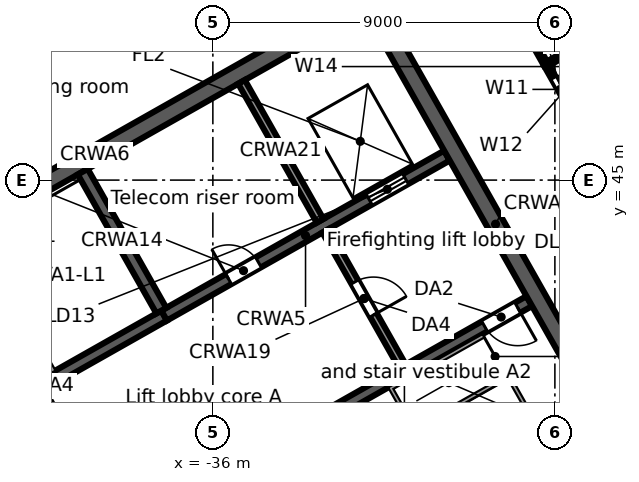
"""IFC4 building model, lengths in metres.
Left out: names, types, materials, properties, quantities, classifications, styles, units other than length and angle.
Written with IfcOpenShell. Run it as: python <this file> out.ifc"""

import sys

from ifc_helpers import new_model, si_unit, direction, frame, frame_2d, origin, place, context, subcontext, project, spatial, rectangle, extrude, element, fill, save


model = new_model("IFC4")
c1 = context("Model", 3, precision=1e-05, world=origin(), true_north=direction((0.0, 1.0)))
c2 = subcontext(c1, "Body", "Model", "MODEL_VIEW")
j1 = project(units=[si_unit("LENGTHUNIT", "METRE"), si_unit("PLANEANGLEUNIT", "RADIAN")], contexts=[c1])
p1 = place(None, origin())
s1 = spatial("IfcSite", under=j1, at=p1, CompositionType="ELEMENT")
p2 = place(p1, origin())
s2 = spatial("IfcBuilding", under=s1, at=p2, CompositionType="ELEMENT")
p3 = place(p2, frame((0.0, 0.0, 227.0)))
s3 = spatial("IfcBuildingStorey", under=s2, at=p3, CompositionType="ELEMENT", Elevation=227.0)
p4 = place(p3, frame((-0.046, 47.974, 0.0), z_axis=(0.0, 0.0, 1.0), x_axis=(-0.870356579543, -0.492421998337, 0.0)))
e1 = element("IfcWall", 1, at=p4, inside=s3, PredefinedType="STANDARD", context=c2, shape_type="SweptSolid", body=[
    extrude(rectangle(XDim=43.754, YDim=0.25, at=frame_2d((21.877, 0.0))), origin(), (0.0, 0.0, 1.0), 3.55),
])
p5 = place(p4, frame((41.061, 0.0, 0.8)))
e2 = element("IfcOpeningElement", 2, at=p5, cuts=e1, PredefinedType="OPENING", context=c2, shape_type="SweptSolid", body=[
    extrude(rectangle(XDim=2.4, YDim=2.2, at=frame_2d((1.2, 1.1))), frame((0.0, 0.135, 0.0), z_axis=(0.0, -1.0, 0.0), x_axis=(1.0, 0.0, 0.0)), (0.0, 0.0, 1.0), 0.27),
])
p6 = place(p4, frame((38.443, 0.0, 0.0)))
e3 = element("IfcOpeningElement", 3, at=p6, cuts=e1, PredefinedType="OPENING", context=c2, shape_type="SweptSolid", body=[
    extrude(rectangle(XDim=1.8, YDim=2.4, at=frame_2d((0.9, 1.2))), frame((0.0, 0.135, 0.0), z_axis=(0.0, -1.0, 0.0), x_axis=(1.0, 0.0, 0.0)), (0.0, 0.0, 1.0), 0.27),
])
p7 = place(p4, frame((35.225, 0.0, 0.8)))
e4 = element("IfcOpeningElement", 4, at=p7, cuts=e1, PredefinedType="OPENING", context=c2, shape_type="SweptSolid", body=[
    extrude(rectangle(XDim=2.4, YDim=2.2, at=frame_2d((1.2, 1.1))), frame((0.0, 0.135, 0.0), z_axis=(0.0, -1.0, 0.0), x_axis=(1.0, 0.0, 0.0)), (0.0, 0.0, 1.0), 0.27),
])
p8 = place(p4, frame((32.307, 0.0, 0.8)))
e5 = element("IfcOpeningElement", 5, at=p8, cuts=e1, PredefinedType="OPENING", context=c2, shape_type="SweptSolid", body=[
    extrude(rectangle(XDim=2.4, YDim=2.2, at=frame_2d((1.2, 1.1))), frame((0.0, 0.135, 0.0), z_axis=(0.0, -1.0, 0.0), x_axis=(1.0, 0.0, 0.0)), (0.0, 0.0, 1.0), 0.27),
])
p9 = place(p4, frame((29.688, 0.0, 0.0)))
e6 = element("IfcOpeningElement", 6, at=p9, cuts=e1, PredefinedType="OPENING", context=c2, shape_type="SweptSolid", body=[
    extrude(rectangle(XDim=1.8, YDim=2.4, at=frame_2d((0.9, 1.2))), frame((0.0, 0.135, 0.0), z_axis=(0.0, -1.0, 0.0), x_axis=(1.0, 0.0, 0.0)), (0.0, 0.0, 1.0), 0.27),
])
p10 = place(p4, frame((26.47, 0.0, 0.8)))
e7 = element("IfcOpeningElement", 7, at=p10, cuts=e1, PredefinedType="OPENING", context=c2, shape_type="SweptSolid", body=[
    extrude(rectangle(XDim=2.4, YDim=2.2, at=frame_2d((1.2, 1.1))), frame((0.0, 0.135, 0.0), z_axis=(0.0, -1.0, 0.0), x_axis=(1.0, 0.0, 0.0)), (0.0, 0.0, 1.0), 0.27),
])
p11 = place(p4, frame((23.552, 0.0, 0.8)))
e8 = element("IfcOpeningElement", 8, at=p11, cuts=e1, PredefinedType="OPENING", context=c2, shape_type="SweptSolid", body=[
    extrude(rectangle(XDim=2.4, YDim=2.2, at=frame_2d((1.2, 1.1))), frame((0.0, 0.135, 0.0), z_axis=(0.0, -1.0, 0.0), x_axis=(1.0, 0.0, 0.0)), (0.0, 0.0, 1.0), 0.27),
])
p12 = place(p4, frame((20.934, 0.0, 0.0)))
e9 = element("IfcOpeningElement", 9, at=p12, cuts=e1, PredefinedType="OPENING", context=c2, shape_type="SweptSolid", body=[
    extrude(rectangle(XDim=1.8, YDim=2.4, at=frame_2d((0.9, 1.2))), frame((0.0, 0.135, 0.0), z_axis=(0.0, -1.0, 0.0), x_axis=(1.0, 0.0, 0.0)), (0.0, 0.0, 1.0), 0.27),
])
p13 = place(p4, frame((17.716, 0.0, 0.8)))
e10 = element("IfcOpeningElement", 10, at=p13, cuts=e1, PredefinedType="OPENING", context=c2, shape_type="SweptSolid", body=[
    extrude(rectangle(XDim=2.4, YDim=2.2, at=frame_2d((1.2, 1.1))), frame((0.0, 0.135, 0.0), z_axis=(0.0, -1.0, 0.0), x_axis=(1.0, 0.0, 0.0)), (0.0, 0.0, 1.0), 0.27),
])
p14 = place(p4, frame((14.798, 0.0, 0.8)))
e11 = element("IfcOpeningElement", 11, at=p14, cuts=e1, PredefinedType="OPENING", context=c2, shape_type="SweptSolid", body=[
    extrude(rectangle(XDim=2.4, YDim=2.2, at=frame_2d((1.2, 1.1))), frame((0.0, 0.135, 0.0), z_axis=(0.0, -1.0, 0.0), x_axis=(1.0, 0.0, 0.0)), (0.0, 0.0, 1.0), 0.27),
])
p15 = place(p4, frame((12.179, 0.0, 0.0)))
e12 = element("IfcOpeningElement", 12, at=p15, cuts=e1, PredefinedType="OPENING", context=c2, shape_type="SweptSolid", body=[
    extrude(rectangle(XDim=1.8, YDim=2.4, at=frame_2d((0.9, 1.2))), frame((0.0, 0.135, 0.0), z_axis=(0.0, -1.0, 0.0), x_axis=(1.0, 0.0, 0.0)), (0.0, 0.0, 1.0), 0.27),
])
p16 = place(p4, frame((8.961, 0.0, 0.8)))
e13 = element("IfcOpeningElement", 13, at=p16, cuts=e1, PredefinedType="OPENING", context=c2, shape_type="SweptSolid", body=[
    extrude(rectangle(XDim=2.4, YDim=2.2, at=frame_2d((1.2, 1.1))), frame((0.0, 0.135, 0.0), z_axis=(0.0, -1.0, 0.0), x_axis=(1.0, 0.0, 0.0)), (0.0, 0.0, 1.0), 0.27),
])
p17 = place(p4, frame((6.043, 0.0, 0.8)))
e14 = element("IfcOpeningElement", 14, at=p17, cuts=e1, PredefinedType="OPENING", context=c2, shape_type="SweptSolid", body=[
    extrude(rectangle(XDim=2.4, YDim=2.2, at=frame_2d((1.2, 1.1))), frame((0.0, 0.135, 0.0), z_axis=(0.0, -1.0, 0.0), x_axis=(1.0, 0.0, 0.0)), (0.0, 0.0, 1.0), 0.27),
])
p18 = place(p4, frame((3.425, 0.0, 0.0)))
e15 = element("IfcOpeningElement", 15, at=p18, cuts=e1, PredefinedType="OPENING", context=c2, shape_type="SweptSolid", body=[
    extrude(rectangle(XDim=1.8, YDim=2.4, at=frame_2d((0.9, 1.2))), frame((0.0, 0.135, 0.0), z_axis=(0.0, -1.0, 0.0), x_axis=(1.0, 0.0, 0.0)), (0.0, 0.0, 1.0), 0.27),
])
p19 = place(p4, frame((0.207, 0.0, 0.8)))
e16 = element("IfcOpeningElement", 16, at=p19, cuts=e1, PredefinedType="OPENING", context=c2, shape_type="SweptSolid", body=[
    extrude(rectangle(XDim=2.4, YDim=2.2, at=frame_2d((1.2, 1.1))), frame((0.0, 0.135, 0.0), z_axis=(0.0, -1.0, 0.0), x_axis=(1.0, 0.0, 0.0)), (0.0, 0.0, 1.0), 0.27),
])
p20 = place(p3, frame((-58.732, 38.771, 0.0), z_axis=(0.0, 0.0, 1.0), x_axis=(0.870354824205, 0.492425100887, 0.0)))
e17 = element("IfcWall", 17, at=p20, inside=s3, PredefinedType="STANDARD", context=c2, shape_type="SweptSolid", body=[
    extrude(rectangle(XDim=64.006, YDim=0.25, at=frame_2d((32.003, 0.0))), origin(), (0.0, 0.0, 1.0), 3.55),
])
p21 = place(p20, frame((61.259, 0.0, 0.8)))
e18 = element("IfcOpeningElement", 18, at=p21, cuts=e17, PredefinedType="OPENING", context=c2, shape_type="SweptSolid", body=[
    extrude(rectangle(XDim=2.4, YDim=2.2, at=frame_2d((1.2, 1.1))), frame((0.0, 0.135, 0.0), z_axis=(0.0, -1.0, 0.0), x_axis=(1.0, 0.0, 0.0)), (0.0, 0.0, 1.0), 0.27),
])
p22 = place(p20, frame((58.216, 0.0, 0.8)))
e19 = element("IfcOpeningElement", 19, at=p22, cuts=e17, PredefinedType="OPENING", context=c2, shape_type="SweptSolid", body=[
    extrude(rectangle(XDim=2.4, YDim=2.2, at=frame_2d((1.2, 1.1))), frame((0.0, 0.135, 0.0), z_axis=(0.0, -1.0, 0.0), x_axis=(1.0, 0.0, 0.0)), (0.0, 0.0, 1.0), 0.27),
])
p23 = place(p20, frame((55.173, 0.0, 0.8)))
e20 = element("IfcOpeningElement", 20, at=p23, cuts=e17, PredefinedType="OPENING", context=c2, shape_type="SweptSolid", body=[
    extrude(rectangle(XDim=2.4, YDim=2.2, at=frame_2d((1.2, 1.1))), frame((0.0, 0.135, 0.0), z_axis=(0.0, -1.0, 0.0), x_axis=(1.0, 0.0, 0.0)), (0.0, 0.0, 1.0), 0.27),
])
p24 = place(p20, frame((52.129, 0.0, 0.8)))
e21 = element("IfcOpeningElement", 21, at=p24, cuts=e17, PredefinedType="OPENING", context=c2, shape_type="SweptSolid", body=[
    extrude(rectangle(XDim=2.4, YDim=2.2, at=frame_2d((1.2, 1.1))), frame((0.0, 0.135, 0.0), z_axis=(0.0, -1.0, 0.0), x_axis=(1.0, 0.0, 0.0)), (0.0, 0.0, 1.0), 0.27),
])
p25 = place(p20, frame((49.086, 0.0, 0.8)))
e22 = element("IfcOpeningElement", 22, at=p25, cuts=e17, PredefinedType="OPENING", context=c2, shape_type="SweptSolid", body=[
    extrude(rectangle(XDim=2.4, YDim=2.2, at=frame_2d((1.2, 1.1))), frame((0.0, 0.135, 0.0), z_axis=(0.0, -1.0, 0.0), x_axis=(1.0, 0.0, 0.0)), (0.0, 0.0, 1.0), 0.27),
])
p26 = place(p20, frame((46.043, 0.0, 0.8)))
e23 = element("IfcOpeningElement", 23, at=p26, cuts=e17, PredefinedType="OPENING", context=c2, shape_type="SweptSolid", body=[
    extrude(rectangle(XDim=2.4, YDim=2.2, at=frame_2d((1.2, 1.1))), frame((0.0, 0.135, 0.0), z_axis=(0.0, -1.0, 0.0), x_axis=(1.0, 0.0, 0.0)), (0.0, 0.0, 1.0), 0.27),
])
p27 = place(p20, frame((43.0, 0.0, 0.8)))
e24 = element("IfcOpeningElement", 24, at=p27, cuts=e17, PredefinedType="OPENING", context=c2, shape_type="SweptSolid", body=[
    extrude(rectangle(XDim=2.4, YDim=2.2, at=frame_2d((1.2, 1.1))), frame((0.0, 0.135, 0.0), z_axis=(0.0, -1.0, 0.0), x_axis=(1.0, 0.0, 0.0)), (0.0, 0.0, 1.0), 0.27),
])
p28 = place(p20, frame((39.956, 0.0, 0.8)))
e25 = element("IfcOpeningElement", 25, at=p28, cuts=e17, PredefinedType="OPENING", context=c2, shape_type="SweptSolid", body=[
    extrude(rectangle(XDim=2.4, YDim=2.2, at=frame_2d((1.2, 1.1))), frame((0.0, 0.135, 0.0), z_axis=(0.0, -1.0, 0.0), x_axis=(1.0, 0.0, 0.0)), (0.0, 0.0, 1.0), 0.27),
])
p29 = place(p20, frame((36.913, 0.0, 0.8)))
e26 = element("IfcOpeningElement", 26, at=p29, cuts=e17, PredefinedType="OPENING", context=c2, shape_type="SweptSolid", body=[
    extrude(rectangle(XDim=2.4, YDim=2.2, at=frame_2d((1.2, 1.1))), frame((0.0, 0.135, 0.0), z_axis=(0.0, -1.0, 0.0), x_axis=(1.0, 0.0, 0.0)), (0.0, 0.0, 1.0), 0.27),
])
p30 = place(p20, frame((33.87, 0.0, 0.8)))
e27 = element("IfcOpeningElement", 27, at=p30, cuts=e17, PredefinedType="OPENING", context=c2, shape_type="SweptSolid", body=[
    extrude(rectangle(XDim=2.4, YDim=2.2, at=frame_2d((1.2, 1.1))), frame((0.0, 0.135, 0.0), z_axis=(0.0, -1.0, 0.0), x_axis=(1.0, 0.0, 0.0)), (0.0, 0.0, 1.0), 0.27),
])
p31 = place(p20, frame((30.826, 0.0, 0.8)))
e28 = element("IfcOpeningElement", 28, at=p31, cuts=e17, PredefinedType="OPENING", context=c2, shape_type="SweptSolid", body=[
    extrude(rectangle(XDim=2.4, YDim=2.2, at=frame_2d((1.2, 1.1))), frame((0.0, 0.135, 0.0), z_axis=(0.0, -1.0, 0.0), x_axis=(1.0, 0.0, 0.0)), (0.0, 0.0, 1.0), 0.27),
])
p32 = place(p20, frame((27.783, 0.0, 0.8)))
e29 = element("IfcOpeningElement", 29, at=p32, cuts=e17, PredefinedType="OPENING", context=c2, shape_type="SweptSolid", body=[
    extrude(rectangle(XDim=2.4, YDim=2.2, at=frame_2d((1.2, 1.1))), frame((0.0, 0.135, 0.0), z_axis=(0.0, -1.0, 0.0), x_axis=(1.0, 0.0, 0.0)), (0.0, 0.0, 1.0), 0.27),
])
p33 = place(p20, frame((24.74, 0.0, 0.8)))
e30 = element("IfcOpeningElement", 30, at=p33, cuts=e17, PredefinedType="OPENING", context=c2, shape_type="SweptSolid", body=[
    extrude(rectangle(XDim=2.4, YDim=2.2, at=frame_2d((1.2, 1.1))), frame((0.0, 0.135, 0.0), z_axis=(0.0, -1.0, 0.0), x_axis=(1.0, 0.0, 0.0)), (0.0, 0.0, 1.0), 0.27),
])
p34 = place(p20, frame((21.696, 0.0, 0.8)))
e31 = element("IfcOpeningElement", 31, at=p34, cuts=e17, PredefinedType="OPENING", context=c2, shape_type="SweptSolid", body=[
    extrude(rectangle(XDim=2.4, YDim=2.2, at=frame_2d((1.2, 1.1))), frame((0.0, 0.135, 0.0), z_axis=(0.0, -1.0, 0.0), x_axis=(1.0, 0.0, 0.0)), (0.0, 0.0, 1.0), 0.27),
])
p35 = place(p20, frame((18.653, 0.0, 0.8)))
e32 = element("IfcOpeningElement", 32, at=p35, cuts=e17, PredefinedType="OPENING", context=c2, shape_type="SweptSolid", body=[
    extrude(rectangle(XDim=2.4, YDim=2.2, at=frame_2d((1.2, 1.1))), frame((0.0, 0.135, 0.0), z_axis=(0.0, -1.0, 0.0), x_axis=(1.0, 0.0, 0.0)), (0.0, 0.0, 1.0), 0.27),
])
p36 = place(p20, frame((15.61, 0.0, 0.8)))
e33 = element("IfcOpeningElement", 33, at=p36, cuts=e17, PredefinedType="OPENING", context=c2, shape_type="SweptSolid", body=[
    extrude(rectangle(XDim=2.4, YDim=2.2, at=frame_2d((1.2, 1.1))), frame((0.0, 0.135, 0.0), z_axis=(0.0, -1.0, 0.0), x_axis=(1.0, 0.0, 0.0)), (0.0, 0.0, 1.0), 0.27),
])
p37 = place(p20, frame((12.567, 0.0, 0.8)))
e34 = element("IfcOpeningElement", 34, at=p37, cuts=e17, PredefinedType="OPENING", context=c2, shape_type="SweptSolid", body=[
    extrude(rectangle(XDim=2.4, YDim=2.2, at=frame_2d((1.2, 1.1))), frame((0.0, 0.135, 0.0), z_axis=(0.0, -1.0, 0.0), x_axis=(1.0, 0.0, 0.0)), (0.0, 0.0, 1.0), 0.27),
])
p38 = place(p20, frame((9.523, 0.0, 0.8)))
e35 = element("IfcOpeningElement", 35, at=p38, cuts=e17, PredefinedType="OPENING", context=c2, shape_type="SweptSolid", body=[
    extrude(rectangle(XDim=2.4, YDim=2.2, at=frame_2d((1.2, 1.1))), frame((0.0, 0.135, 0.0), z_axis=(0.0, -1.0, 0.0), x_axis=(1.0, 0.0, 0.0)), (0.0, 0.0, 1.0), 0.27),
])
p39 = place(p20, frame((6.48, 0.0, 0.8)))
e36 = element("IfcOpeningElement", 36, at=p39, cuts=e17, PredefinedType="OPENING", context=c2, shape_type="SweptSolid", body=[
    extrude(rectangle(XDim=2.4, YDim=2.2, at=frame_2d((1.2, 1.1))), frame((0.0, 0.135, 0.0), z_axis=(0.0, -1.0, 0.0), x_axis=(1.0, 0.0, 0.0)), (0.0, 0.0, 1.0), 0.27),
])
p40 = place(p20, frame((3.437, 0.0, 0.8)))
e37 = element("IfcOpeningElement", 37, at=p40, cuts=e17, PredefinedType="OPENING", context=c2, shape_type="SweptSolid", body=[
    extrude(rectangle(XDim=2.4, YDim=2.2, at=frame_2d((1.2, 1.1))), frame((0.0, 0.135, 0.0), z_axis=(0.0, -1.0, 0.0), x_axis=(1.0, 0.0, 0.0)), (0.0, 0.0, 1.0), 0.27),
])
p41 = place(p20, frame((0.393, 0.0, 0.8)))
e38 = element("IfcOpeningElement", 38, at=p41, cuts=e17, PredefinedType="OPENING", context=c2, shape_type="SweptSolid", body=[
    extrude(rectangle(XDim=2.4, YDim=2.2, at=frame_2d((1.2, 1.1))), frame((0.0, 0.135, 0.0), z_axis=(0.0, -1.0, 0.0), x_axis=(1.0, 0.0, 0.0)), (0.0, 0.0, 1.0), 0.27),
])
p42 = place(p3, frame((-34.245, 38.097, 0.0), z_axis=(0.0, 0.0, 1.0), x_axis=(0.870360409231, 0.492415229297, 0.0)))
e39 = element("IfcWall", 39, at=p42, inside=s3, PredefinedType="SOLIDWALL", context=c2, shape_type="SweptSolid", body=[
    extrude(rectangle(XDim=7.55, YDim=0.3, at=frame_2d((3.775, 0.0))), origin(), (0.0, 0.0, 1.0), 3.55),
])
p43 = place(p42, frame((6.2, 0.0, 0.0)))
e40 = element("IfcOpeningElement", 40, at=p43, cuts=e39, PredefinedType="OPENING", context=c2, shape_type="SweptSolid", body=[
    extrude(rectangle(XDim=1.0, YDim=2.1, at=frame_2d((0.5, 1.05))), frame((0.0, 0.16, 0.0), z_axis=(0.0, -1.0, 0.0), x_axis=(1.0, 0.0, 0.0)), (0.0, 0.0, 1.0), 0.32),
])
p44 = place(p3, frame((-43.853, 37.717, 0.0), z_axis=(0.0, 0.0, 1.0), x_axis=(0.870360409231, 0.492415229297, 0.0)))
e41 = element("IfcWall", 41, at=p44, inside=s3, PredefinedType="SOLIDWALL", context=c2, shape_type="SweptSolid", body=[
    extrude(rectangle(XDim=7.55, YDim=0.3, at=frame_2d((3.775, 0.0))), origin(), (0.0, 0.0, 1.0), 3.55),
])
p45 = place(p44, frame((0.35, 0.0, 0.0)))
e42 = element("IfcOpeningElement", 42, at=p45, cuts=e41, PredefinedType="OPENING", context=c2, shape_type="SweptSolid", body=[
    extrude(rectangle(XDim=1.0, YDim=2.1, at=frame_2d((0.5, 1.05))), frame((0.0, 0.16, 0.0), z_axis=(0.0, -1.0, 0.0), x_axis=(1.0, 0.0, 0.0)), (0.0, 0.0, 1.0), 0.32),
])
p46 = place(p3, frame((-37.282, 41.435, 0.0), z_axis=(0.0, 0.0, 1.0), x_axis=(0.870352688754, 0.492428875248, 0.0)))
e43 = element("IfcWall", 43, at=p46, inside=s3, PredefinedType="SOLIDWALL", context=c2, shape_type="SweptSolid", body=[
    extrude(rectangle(XDim=8.55, YDim=0.3, at=frame_2d((4.275, 0.0))), origin(), (0.0, 0.0, 1.0), 3.55),
])
p47 = place(p46, frame((6.2, 0.0, 0.0)))
e44 = element("IfcOpeningElement", 44, at=p47, cuts=e43, PredefinedType="OPENING", context=c2, shape_type="SweptSolid", body=[
    extrude(rectangle(XDim=1.1, YDim=2.1, at=frame_2d((0.55, 1.05))), frame((0.0, 0.16, 0.0), z_axis=(0.0, -1.0, 0.0), x_axis=(1.0, 0.0, 0.0)), (0.0, 0.0, 1.0), 0.32),
])
p48 = place(p46, frame((1.95, 0.0, 0.0)))
e45 = element("IfcOpeningElement", 45, at=p48, cuts=e43, PredefinedType="OPENING", context=c2, shape_type="SweptSolid", body=[
    extrude(rectangle(XDim=0.9, YDim=2.1, at=frame_2d((0.45, 1.05))), frame((0.0, 0.16, 0.0), z_axis=(0.0, -1.0, 0.0), x_axis=(1.0, 0.0, 0.0)), (0.0, 0.0, 1.0), 0.32),
])
p49 = place(p3, frame((-46.498, 41.477, 0.0), z_axis=(0.0, 0.0, 1.0), x_axis=(0.870359753402, 0.492416388494, 0.0)))
e46 = element("IfcWall", 46, at=p49, inside=s3, PredefinedType="SOLIDWALL", context=c2, shape_type="SweptSolid", body=[
    extrude(rectangle(XDim=17.0, YDim=0.45, at=frame_2d((8.5, 0.0))), origin(), (0.0, 0.0, 1.0), 3.55),
])
p50 = place(p3, frame((-46.191, 41.392, 0.0), z_axis=(0.0, 0.0, 1.0), x_axis=(0.492421378713, -0.870356930107, 0.0)))
e47 = element("IfcWall", 47, at=p50, inside=s3, PredefinedType="SOLIDWALL", context=c2, shape_type="SweptSolid", body=[
    extrude(rectangle(XDim=13.1, YDim=0.45, at=frame_2d((6.55, 0.0))), origin(), (0.0, 0.0, 1.0), 3.55),
])
p51 = place(p3, frame((-40.516, 39.433, 0.0), z_axis=(0.0, 0.0, 1.0), x_axis=(0.492453559952, -0.87033872216, 0.0)))
e48 = element("IfcWall", 48, at=p51, inside=s3, PredefinedType="PARTITIONING", context=c2, shape_type="SweptSolid", body=[
    extrude(rectangle(XDim=4.1, YDim=0.2, at=frame_2d((2.05, 0.0))), origin(), (0.0, 0.0, 1.0), 3.55),
])
p52 = place(p51, frame((1.55, 0.0, 0.0)))
e49 = element("IfcOpeningElement", 49, at=p52, cuts=e48, PredefinedType="OPENING", context=c2, shape_type="SweptSolid", body=[
    extrude(rectangle(XDim=1.0, YDim=2.1, at=frame_2d((0.5, 1.05))), frame((0.0, 0.11, 0.0), z_axis=(0.0, -1.0, 0.0), x_axis=(1.0, 0.0, 0.0)), (0.0, 0.0, 1.0), 0.22),
])
p53 = place(p3, frame((-39.424, 45.22, 0.0), z_axis=(0.0, 0.0, 1.0), x_axis=(0.492409653846, -0.870363563575, 0.0)))
e50 = element("IfcWall", 50, at=p53, inside=s3, PredefinedType="SOLIDWALL", context=c2, shape_type="SweptSolid", body=[
    extrude(rectangle(XDim=4.2, YDim=0.3, at=frame_2d((2.1, 0.0))), origin(), (0.0, 0.0, 1.0), 3.55),
])
p54 = place(p3, frame((-33.031, 43.667, 0.0), z_axis=(0.0, 0.0, 1.0), x_axis=(0.492408451753, -0.87036424366, 0.0)))
e51 = element("IfcWall", 51, at=p54, inside=s3, PredefinedType="PARTITIONING", context=c2, shape_type="SweptSolid", body=[
    extrude(rectangle(XDim=4.1, YDim=0.2, at=frame_2d((2.05, 0.0))), origin(), (0.0, 0.0, 1.0), 3.55),
])
p55 = place(p54, frame((1.55, 0.0, 0.0)))
e52 = element("IfcOpeningElement", 52, at=p55, cuts=e51, PredefinedType="OPENING", context=c2, shape_type="SweptSolid", body=[
    extrude(rectangle(XDim=1.0, YDim=2.1, at=frame_2d((0.5, 1.05))), frame((0.0, 0.11, 0.0), z_axis=(0.0, -1.0, 0.0), x_axis=(1.0, 0.0, 0.0)), (0.0, 0.0, 1.0), 0.22),
])
p56 = place(p3, frame((-35.246, 47.584, 0.0), z_axis=(0.0, 0.0, 1.0), x_axis=(0.492409653846, -0.870363563575, 0.0)))
e53 = element("IfcWall", 53, at=p56, inside=s3, PredefinedType="SOLIDWALL", context=c2, shape_type="SweptSolid", body=[
    extrude(rectangle(XDim=4.2, YDim=0.2, at=frame_2d((2.1, 0.0))), origin(), (0.0, 0.0, 1.0), 3.55),
])
p57 = place(p3, frame((-31.787, 49.542, 0.0), z_axis=(0.0, 0.0, 1.0), x_axis=(0.492421378713, -0.870356930107, 0.0)))
e54 = element("IfcWall", 54, at=p57, inside=s3, PredefinedType="SOLIDWALL", context=c2, shape_type="SweptSolid", body=[
    extrude(rectangle(XDim=13.1, YDim=0.45, at=frame_2d((6.55, 0.0))), origin(), (0.0, 0.0, 1.0), 3.55),
])
p58 = place(p3, frame((-29.201, 51.521, 0.0), z_axis=(0.0, 0.0, 1.0), x_axis=(0.492340861121, -0.870402479587, 0.0)))
e55 = element("IfcWall", 55, at=p58, inside=s3, PredefinedType="PARTITIONING", context=c2, shape_type="SweptSolid", body=[
    extrude(rectangle(XDim=3.999, YDim=0.125, at=frame_2d((2.0, 0.0))), origin(), (0.0, 0.0, 1.0), 3.55),
])
p59 = place(p58, frame((1.45, 0.0, 0.0)))
e56 = element("IfcOpeningElement", 56, at=p59, cuts=e55, PredefinedType="OPENING", context=c2, shape_type="SweptSolid", body=[
    extrude(rectangle(XDim=0.9, YDim=2.1, at=frame_2d((0.45, 1.05))), frame((0.0, 0.073, 0.0), z_axis=(0.0, -1.0, 0.0), x_axis=(1.0, 0.0, 0.0)), (0.0, 0.0, 1.0), 0.145),
])
p60 = place(p3, frame((-27.232, 48.04, 0.0), z_axis=(0.0, 0.0, 1.0), x_axis=(0.492437810475, -0.870347633314, 0.0)))
e57 = element("IfcWall", 57, at=p60, inside=s3, PredefinedType="PARTITIONING", context=c2, shape_type="SweptSolid", body=[
    extrude(rectangle(XDim=1.501, YDim=0.125, at=frame_2d((0.75, 0.0))), origin(), (0.0, 0.0, 1.0), 3.55),
])
p61 = place(p60, frame((0.4, 0.0, 0.0)))
e58 = element("IfcOpeningElement", 58, at=p61, cuts=e57, PredefinedType="OPENING", context=c2, shape_type="SweptSolid", body=[
    extrude(rectangle(XDim=0.9, YDim=2.1, at=frame_2d((0.45, 1.05))), frame((0.0, 0.073, 0.0), z_axis=(0.0, -1.0, 0.0), x_axis=(1.0, 0.0, 0.0)), (0.0, 0.0, 1.0), 0.145),
])
p62 = place(p3, frame((-27.232, 48.04, 0.0), z_axis=(0.0, 0.0, 1.0), x_axis=(0.870339461844, 0.492452252668, 0.0)))
e59 = element("IfcWall", 59, at=p62, inside=s3, PredefinedType="PARTITIONING", context=c2, shape_type="SweptSolid", body=[
    extrude(rectangle(XDim=5.091, YDim=0.125, at=frame_2d((2.545, 0.0))), origin(), (0.0, 0.0, 1.0), 2.722),
])
p63 = place(p47, origin())
e60 = element("IfcDoor", 60, at=p63, inside=s3, OperationType="DOUBLE_DOOR_SLIDING", PredefinedType="DOOR", context=c2, shape_type="SweptSolid", body=[
    extrude(rectangle(XDim=1.1, YDim=2.1, at=frame_2d((0.55, 1.05))), frame((0.0, 0.025, 0.0), z_axis=(0.0, -1.0, 0.0), x_axis=(1.0, 0.0, 0.0)), (0.0, 0.0, 1.0), 0.05),
])
fill(e44, e60)
p64 = place(p43, frame((1.0, 0.0, 0.0), z_axis=(0.0, 0.0, 1.0), x_axis=(-1.0, 0.0, 0.0)))
e61 = element("IfcDoor", 61, at=p64, inside=s3, OperationType="SINGLE_SWING_LEFT", PredefinedType="DOOR", context=c2, shape_type="SweptSolid", body=[
    extrude(rectangle(XDim=1.0, YDim=2.1, at=frame_2d((0.5, 1.05))), frame((0.0, 0.025, 0.0), z_axis=(0.0, -1.0, 0.0), x_axis=(1.0, 0.0, 0.0)), (0.0, 0.0, 1.0), 0.05),
])
fill(e40, e61)
p65 = place(p55, origin())
e62 = element("IfcDoor", 62, at=p65, inside=s3, OperationType="SINGLE_SWING_RIGHT", PredefinedType="DOOR", context=c2, shape_type="SweptSolid", body=[
    extrude(rectangle(XDim=1.0, YDim=2.1, at=frame_2d((0.5, 1.05))), frame((0.0, 0.025, 0.0), z_axis=(0.0, -1.0, 0.0), x_axis=(1.0, 0.0, 0.0)), (0.0, 0.0, 1.0), 0.05),
])
fill(e52, e62)
p66 = place(p48, origin())
e63 = element("IfcDoor", 63, at=p66, inside=s3, OperationType="SINGLE_SWING_LEFT", PredefinedType="DOOR", context=c2, shape_type="SweptSolid", body=[
    extrude(rectangle(XDim=0.9, YDim=2.1, at=frame_2d((0.45, 1.05))), frame((0.0, 0.025, 0.0), z_axis=(0.0, -1.0, 0.0), x_axis=(1.0, 0.0, 0.0)), (0.0, 0.0, 1.0), 0.05),
])
fill(e45, e63)
p67 = place(p61, origin())
e64 = element("IfcDoor", 64, at=p67, inside=s3, OperationType="SINGLE_SWING_RIGHT", PredefinedType="DOOR", context=c2, shape_type="SweptSolid", body=[
    extrude(rectangle(XDim=0.9, YDim=2.1, at=frame_2d((0.45, 1.05))), frame((0.0, 0.025, 0.0), z_axis=(0.0, -1.0, 0.0), x_axis=(1.0, 0.0, 0.0)), (0.0, 0.0, 1.0), 0.05),
])
fill(e58, e64)
save(model, sys.argv[1])
